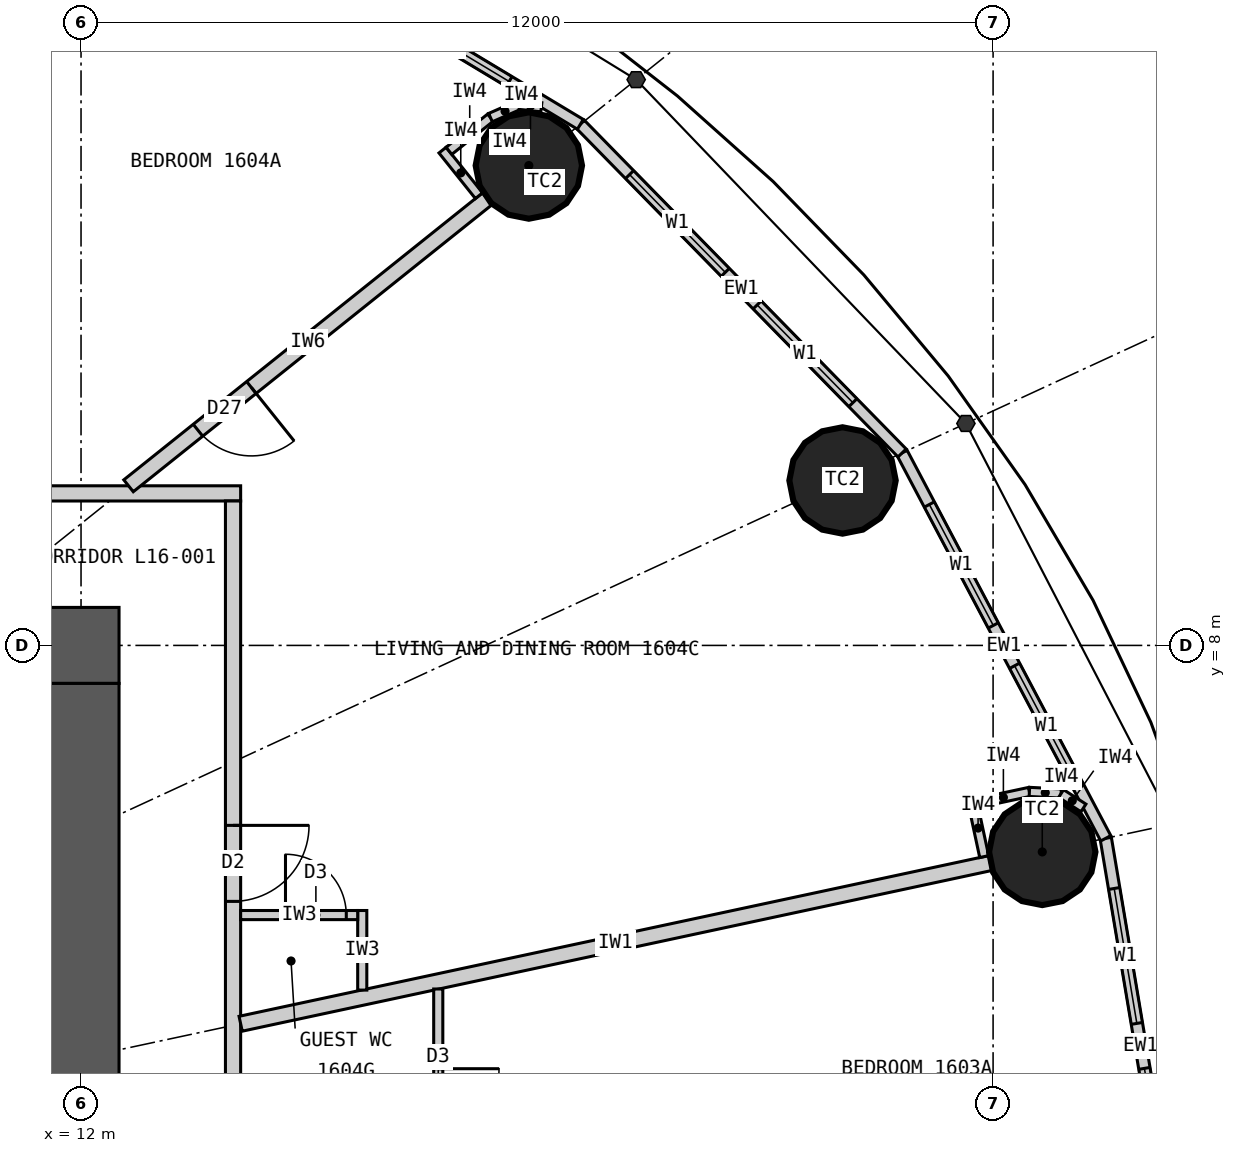
"""IFC4 building model, lengths in metres.
Left out: names, types, materials, properties, quantities, classifications, styles, units other than length and angle.
Written with IfcOpenShell. Run it as: python <this file> out.ifc"""

import sys

from ifc_helpers import new_model, si_unit, direction, frame, frame_2d, origin, origin_2d, place, context, subcontext, project, spatial, rectangle, circle, extrude, element, fill, save


model = new_model("IFC4")
c1 = context("Model", 3, precision=1e-05, world=origin(), true_north=direction((0.0, 1.0)))
c2 = subcontext(c1, "Body", "Model", "MODEL_VIEW")
j1 = project(units=[si_unit("LENGTHUNIT", "METRE"), si_unit("PLANEANGLEUNIT", "RADIAN")], contexts=[c1])
p1 = place(None, origin())
s1 = spatial("IfcSite", under=j1, at=p1, CompositionType="ELEMENT")
p2 = place(p1, origin())
s2 = spatial("IfcBuilding", under=s1, at=p2, CompositionType="ELEMENT")
p3 = place(p2, frame((0.0, 0.0, 67.2)))
s3 = spatial("IfcBuildingStorey", under=s2, at=p3, CompositionType="ELEMENT", Elevation=67.2)
for number, where, z_axis, x_axis in (
    (1, (24.647, 5.283, 0.0), (0.0, 0.0, 1.0), (1.0, 0.0, 0.0)),
    (2, (22.019, 10.17, 0.0), (0.0, 0.0, 1.0), (1.0, 0.0, 0.0)),
    (3, (17.892, 14.313, 0.0), (0.0, 0.0, 1.0), (1.0, 0.0, 0.0)),
):
    element("IfcColumn", number, at=place(p3, frame(where, z_axis=z_axis, x_axis=x_axis)), inside=s3, PredefinedType="COLUMN", context=c2, shape_type="SweptSolid", body=[
        extrude(circle(Radius=0.7, at=origin_2d()), origin(), (0.0, 0.0, 1.0), 3.3),
    ])
p4 = place(p3, frame((-12.5, 8.0, 0.0), z_axis=(0.0, 0.0, 1.0), x_axis=(1.0, 0.0, 0.0)))
e4 = element("IfcWall", 4, at=p4, inside=s3, PredefinedType="SHEAR", context=c2, shape_type="SweptSolid", body=[
    extrude(rectangle(XDim=25.0, YDim=1.0, at=frame_2d((12.5, 0.0))), origin(), (0.0, 0.0, 1.0), 3.3),
])
p5 = place(p4, frame((11.2, 0.0, 0.0)))
e5 = element("IfcOpeningElement", 5, at=p5, cuts=e4, PredefinedType="OPENING", context=c2, shape_type="SweptSolid", body=[
    extrude(rectangle(XDim=1.2, YDim=2.2, at=frame_2d((0.6, 1.1))), frame((0.0, 0.51, 0.0), z_axis=(0.0, -1.0, 0.0), x_axis=(1.0, 0.0, 0.0)), (0.0, 0.0, 1.0), 1.02),
])
p6 = place(p4, frame((18.8, 0.0, 0.0)))
e6 = element("IfcOpeningElement", 6, at=p6, cuts=e4, PredefinedType="OPENING", context=c2, shape_type="SweptSolid", body=[
    extrude(rectangle(XDim=0.9, YDim=2.2, at=frame_2d((0.45, 1.1))), frame((0.0, 0.51, 0.0), z_axis=(0.0, -1.0, 0.0), x_axis=(1.0, 0.0, 0.0)), (0.0, 0.0, 1.0), 1.02),
])
p7 = place(p3, frame((12.0, -7.5, 0.0), z_axis=(0.0, 0.0, 1.0), x_axis=(0.0, 1.0, 0.0)))
e7 = element("IfcWall", 7, at=p7, inside=s3, PredefinedType="SHEAR", context=c2, shape_type="SweptSolid", body=[
    extrude(rectangle(XDim=15.0, YDim=1.0, at=frame_2d((7.5, 0.0))), origin(), (0.0, 0.0, 1.0), 3.3),
])
p8 = place(p7, frame((6.6, 0.0, 0.0)))
e8 = element("IfcOpeningElement", 8, at=p8, cuts=e7, PredefinedType="OPENING", context=c2, shape_type="SweptSolid", body=[
    extrude(rectangle(XDim=1.8, YDim=2.2, at=frame_2d((0.9, 1.1))), frame((0.0, 0.51, 0.0), z_axis=(0.0, -1.0, 0.0), x_axis=(1.0, 0.0, 0.0)), (0.0, 0.0, 1.0), 1.02),
])
p9 = place(p3, frame((26.4, 0.0, 0.0), z_axis=(0.0, 0.0, 1.0), x_axis=(-0.165642551694, 0.986185857264, 0.0)))
e9 = element("IfcWall", 9, at=p9, inside=s3, PredefinedType="ELEMENTEDWALL", context=c2, shape_type="SweptSolid", body=[
    extrude(rectangle(XDim=5.539, YDim=0.15, at=frame_2d((2.77, 0.0))), origin(), (0.0, 0.0, 1.0), 3.12),
])
p10 = place(p9, frame((0.669, 0.0, 0.9)))
e10 = element("IfcOpeningElement", 10, at=p10, cuts=e9, PredefinedType="OPENING", context=c2, shape_type="SweptSolid", body=[
    extrude(rectangle(XDim=1.8, YDim=1.9, at=frame_2d((0.9, 0.95))), frame((0.0, 0.085, 0.0), z_axis=(0.0, -1.0, 0.0), x_axis=(1.0, 0.0, 0.0)), (0.0, 0.0, 1.0), 0.17),
])
p11 = place(p9, frame((3.07, 0.0, 0.9)))
e11 = element("IfcOpeningElement", 11, at=p11, cuts=e9, PredefinedType="OPENING", context=c2, shape_type="SweptSolid", body=[
    extrude(rectangle(XDim=1.8, YDim=1.9, at=frame_2d((0.9, 0.95))), frame((0.0, 0.085, 0.0), z_axis=(0.0, -1.0, 0.0), x_axis=(1.0, 0.0, 0.0)), (0.0, 0.0, 1.0), 0.17),
])
p12 = place(p3, frame((25.482, 5.462, 0.0), z_axis=(0.0, 0.0, 1.0), x_axis=(-0.467296867008, 0.884100468321, 0.0)))
e12 = element("IfcWall", 12, at=p12, inside=s3, PredefinedType="ELEMENTEDWALL", context=c2, shape_type="SweptSolid", body=[
    extrude(rectangle(XDim=5.734, YDim=0.15, at=frame_2d((2.867, 0.0))), origin(), (0.0, 0.0, 1.0), 3.12),
])
p13 = place(p12, frame((0.767, 0.0, 0.9)))
e13 = element("IfcOpeningElement", 13, at=p13, cuts=e12, PredefinedType="OPENING", context=c2, shape_type="SweptSolid", body=[
    extrude(rectangle(XDim=1.8, YDim=1.9, at=frame_2d((0.9, 0.95))), frame((0.0, 0.085, 0.0), z_axis=(0.0, -1.0, 0.0), x_axis=(1.0, 0.0, 0.0)), (0.0, 0.0, 1.0), 0.17),
])
p14 = place(p12, frame((3.167, 0.0, 0.9)))
e14 = element("IfcOpeningElement", 14, at=p14, cuts=e12, PredefinedType="OPENING", context=c2, shape_type="SweptSolid", body=[
    extrude(rectangle(XDim=1.8, YDim=1.9, at=frame_2d((0.9, 0.95))), frame((0.0, 0.085, 0.0), z_axis=(0.0, -1.0, 0.0), x_axis=(1.0, 0.0, 0.0)), (0.0, 0.0, 1.0), 0.17),
])
p15 = place(p3, frame((22.803, 10.532, 0.0), z_axis=(0.0, 0.0, 1.0), x_axis=(-0.699602905915, 0.714531856557, 0.0)))
e15 = element("IfcWall", 15, at=p15, inside=s3, PredefinedType="ELEMENTEDWALL", context=c2, shape_type="SweptSolid", body=[
    extrude(rectangle(XDim=6.051, YDim=0.15, at=frame_2d((3.025, 0.0))), origin(), (0.0, 0.0, 1.0), 3.12),
])
p16 = place(p15, frame((0.926, 0.0, 0.9)))
e16 = element("IfcOpeningElement", 16, at=p16, cuts=e15, PredefinedType="OPENING", context=c2, shape_type="SweptSolid", body=[
    extrude(rectangle(XDim=1.8, YDim=1.9, at=frame_2d((0.9, 0.95))), frame((0.0, 0.085, 0.0), z_axis=(0.0, -1.0, 0.0), x_axis=(1.0, 0.0, 0.0)), (0.0, 0.0, 1.0), 0.17),
])
p17 = place(p15, frame((3.325, 0.0, 0.9)))
e17 = element("IfcOpeningElement", 17, at=p17, cuts=e15, PredefinedType="OPENING", context=c2, shape_type="SweptSolid", body=[
    extrude(rectangle(XDim=1.8, YDim=1.9, at=frame_2d((0.9, 0.95))), frame((0.0, 0.085, 0.0), z_axis=(0.0, -1.0, 0.0), x_axis=(1.0, 0.0, 0.0)), (0.0, 0.0, 1.0), 0.17),
])
p18 = place(p3, frame((18.57, 14.856, 0.0), z_axis=(0.0, 0.0, 1.0), x_axis=(-0.856983180864, 0.515344377787, 0.0)))
e18 = element("IfcWall", 18, at=p18, inside=s3, PredefinedType="ELEMENTEDWALL", context=c2, shape_type="SweptSolid", body=[
    extrude(rectangle(XDim=6.386, YDim=0.15, at=frame_2d((3.193, 0.0))), origin(), (0.0, 0.0, 1.0), 3.12),
])
p19 = place(p18, frame((1.093, 0.0, 0.9)))
e19 = element("IfcOpeningElement", 19, at=p19, cuts=e18, PredefinedType="OPENING", context=c2, shape_type="SweptSolid", body=[
    extrude(rectangle(XDim=1.8, YDim=1.9, at=frame_2d((0.9, 0.95))), frame((0.0, 0.085, 0.0), z_axis=(0.0, -1.0, 0.0), x_axis=(1.0, 0.0, 0.0)), (0.0, 0.0, 1.0), 0.17),
])
p20 = place(p18, frame((3.493, 0.0, 0.9)))
e20 = element("IfcOpeningElement", 20, at=p20, cuts=e18, PredefinedType="OPENING", context=c2, shape_type="SweptSolid", body=[
    extrude(rectangle(XDim=1.8, YDim=1.9, at=frame_2d((0.9, 0.95))), frame((0.0, 0.085, 0.0), z_axis=(0.0, -1.0, 0.0), x_axis=(1.0, 0.0, 0.0)), (0.0, 0.0, 1.0), 0.17),
])
p21 = place(p3, frame((-14.1, 10.0, 0.0), z_axis=(0.0, 0.0, 1.0), x_axis=(1.0, 0.0, 0.0)))
e21 = element("IfcWall", 21, at=p21, inside=s3, PredefinedType="PARTITIONING", context=c2, shape_type="SweptSolid", body=[
    extrude(rectangle(XDim=28.2, YDim=0.2, at=frame_2d((14.1, 0.0))), origin(), (0.0, 0.0, 1.0), 3.12),
])
p22 = place(p21, frame((18.529, 0.0, 0.0)))
e22 = element("IfcOpeningElement", 22, at=p22, cuts=e21, PredefinedType="OPENING", context=c2, shape_type="SweptSolid", body=[
    extrude(rectangle(XDim=1.0, YDim=2.2, at=frame_2d((0.5, 1.1))), frame((0.0, 0.11, 0.0), z_axis=(0.0, -1.0, 0.0), x_axis=(1.0, 0.0, 0.0)), (0.0, 0.0, 1.0), 0.22),
])
p23 = place(p21, frame((14.623, 0.0, 0.0)))
e23 = element("IfcOpeningElement", 23, at=p23, cuts=e21, PredefinedType="OPENING", context=c2, shape_type="SweptSolid", body=[
    extrude(rectangle(XDim=1.0, YDim=2.2, at=frame_2d((0.5, 1.1))), frame((0.0, 0.11, 0.0), z_axis=(0.0, -1.0, 0.0), x_axis=(1.0, 0.0, 0.0)), (0.0, 0.0, 1.0), 0.22),
])
p24 = place(p21, frame((11.24, 0.0, 0.0)))
e24 = element("IfcOpeningElement", 24, at=p24, cuts=e21, PredefinedType="OPENING", context=c2, shape_type="SweptSolid", body=[
    extrude(rectangle(XDim=1.0, YDim=2.2, at=frame_2d((0.5, 1.1))), frame((0.0, 0.11, 0.0), z_axis=(0.0, -1.0, 0.0), x_axis=(1.0, 0.0, 0.0)), (0.0, 0.0, 1.0), 0.22),
])
p25 = place(p21, frame((8.671, 0.0, 0.0)))
e25 = element("IfcOpeningElement", 25, at=p25, cuts=e21, PredefinedType="OPENING", context=c2, shape_type="SweptSolid", body=[
    extrude(rectangle(XDim=1.0, YDim=2.2, at=frame_2d((0.5, 1.1))), frame((0.0, 0.11, 0.0), z_axis=(0.0, -1.0, 0.0), x_axis=(1.0, 0.0, 0.0)), (0.0, 0.0, 1.0), 0.22),
])
p26 = place(p21, frame((2.801, 0.0, 0.0)))
e26 = element("IfcOpeningElement", 26, at=p26, cuts=e21, PredefinedType="OPENING", context=c2, shape_type="SweptSolid", body=[
    extrude(rectangle(XDim=1.0, YDim=2.2, at=frame_2d((0.5, 1.1))), frame((0.0, 0.11, 0.0), z_axis=(0.0, -1.0, 0.0), x_axis=(1.0, 0.0, 0.0)), (0.0, 0.0, 1.0), 0.22),
])
p27 = place(p3, frame((14.0, -9.9, 0.0), z_axis=(0.0, 0.0, 1.0), x_axis=(0.0, 1.0, 0.0)))
e27 = element("IfcWall", 27, at=p27, inside=s3, PredefinedType="PARTITIONING", context=c2, shape_type="SweptSolid", body=[
    extrude(rectangle(XDim=19.8, YDim=0.2, at=frame_2d((9.9, 0.0))), origin(), (0.0, 0.0, 1.0), 3.12),
])
p28 = place(p27, frame((0.103, 0.0, 0.0)))
e28 = element("IfcOpeningElement", 28, at=p28, cuts=e27, PredefinedType="OPENING", context=c2, shape_type="SweptSolid", body=[
    extrude(rectangle(XDim=1.0, YDim=2.2, at=frame_2d((0.5, 1.1))), frame((0.0, 0.11, 0.0), z_axis=(0.0, -1.0, 0.0), x_axis=(1.0, 0.0, 0.0)), (0.0, 0.0, 1.0), 0.22),
])
p29 = place(p27, frame((5.248, 0.0, 0.0)))
e29 = element("IfcOpeningElement", 29, at=p29, cuts=e27, PredefinedType="OPENING", context=c2, shape_type="SweptSolid", body=[
    extrude(rectangle(XDim=1.0, YDim=2.2, at=frame_2d((0.5, 1.1))), frame((0.0, 0.11, 0.0), z_axis=(0.0, -1.0, 0.0), x_axis=(1.0, 0.0, 0.0)), (0.0, 0.0, 1.0), 0.22),
])
p30 = place(p27, frame((8.438, 0.0, 0.0)))
e30 = element("IfcOpeningElement", 30, at=p30, cuts=e27, PredefinedType="OPENING", context=c2, shape_type="SweptSolid", body=[
    extrude(rectangle(XDim=1.0, YDim=2.2, at=frame_2d((0.5, 1.1))), frame((0.0, 0.11, 0.0), z_axis=(0.0, -1.0, 0.0), x_axis=(1.0, 0.0, 0.0)), (0.0, 0.0, 1.0), 0.22),
])
p31 = place(p27, frame((14.532, 0.0, 0.0)))
e31 = element("IfcOpeningElement", 31, at=p31, cuts=e27, PredefinedType="OPENING", context=c2, shape_type="SweptSolid", body=[
    extrude(rectangle(XDim=1.0, YDim=2.2, at=frame_2d((0.5, 1.1))), frame((0.0, 0.11, 0.0), z_axis=(0.0, -1.0, 0.0), x_axis=(1.0, 0.0, 0.0)), (0.0, 0.0, 1.0), 0.22),
])
p32 = place(p3, frame((14.1, 3.022, 0.0), z_axis=(0.0, 0.0, 1.0), x_axis=(0.977790014929, 0.209586943072, 0.0)))
e32 = element("IfcWall", 32, at=p32, inside=s3, PredefinedType="PARTITIONING", context=c2, shape_type="SweptSolid", body=[
    extrude(rectangle(XDim=10.087, YDim=0.2, at=frame_2d((5.043, 0.0))), origin(), (0.0, 0.0, 1.0), 2.32),
])
p33 = place(p3, frame((12.625, 10.1, 0.0), z_axis=(0.0, 0.0, 1.0), x_axis=(0.780892451574, 0.624665493744, 0.0)))
e33 = element("IfcWall", 33, at=p33, inside=s3, PredefinedType="PARTITIONING", context=c2, shape_type="SweptSolid", body=[
    extrude(rectangle(XDim=6.045, YDim=0.2, at=frame_2d((3.022, 0.0))), origin(), (0.0, 0.0, 1.0), 2.32),
])
p34 = place(p33, frame((1.17, 0.0, 0.0)))
e34 = element("IfcOpeningElement", 34, at=p34, cuts=e33, PredefinedType="OPENING", context=c2, shape_type="SweptSolid", body=[
    extrude(rectangle(XDim=0.9, YDim=2.1, at=frame_2d((0.45, 1.05))), frame((0.0, 0.11, 0.0), z_axis=(0.0, -1.0, 0.0), x_axis=(1.0, 0.0, 0.0)), (0.0, 0.0, 1.0), 0.22),
])
p35 = place(p3, frame((7.289, 10.1, 0.0), z_axis=(0.0, 0.0, 1.0), x_axis=(0.585198353053, 0.810890182197, 0.0)))
e35 = element("IfcWall", 35, at=p35, inside=s3, PredefinedType="PARTITIONING", context=c2, shape_type="SweptSolid", body=[
    extrude(rectangle(XDim=8.36, YDim=0.2, at=frame_2d((4.18, 0.0))), origin(), (0.0, 0.0, 1.0), 2.32),
])
p36 = place(p3, frame((16.7, 3.48, 0.0), z_axis=(0.0, 0.0, 1.0), x_axis=(0.0, -1.0, 0.0)))
e36 = element("IfcWall", 36, at=p36, inside=s3, PredefinedType="PARTITIONING", context=c2, shape_type="SweptSolid", body=[
    extrude(rectangle(XDim=2.897, YDim=0.12, at=frame_2d((1.449, 0.0))), origin(), (0.0, 0.0, 1.0), 3.12),
])
p37 = place(p36, frame((1.049, 0.0, 0.0)))
e37 = element("IfcOpeningElement", 37, at=p37, cuts=e36, PredefinedType="OPENING", context=c2, shape_type="SweptSolid", body=[
    extrude(rectangle(XDim=0.8, YDim=2.1, at=frame_2d((0.4, 1.05))), frame((0.0, 0.07, 0.0), z_axis=(0.0, -1.0, 0.0), x_axis=(1.0, 0.0, 0.0)), (0.0, 0.0, 1.0), 0.14),
])
p38 = place(p3, frame((15.7, 3.465, 0.0), z_axis=(0.0, 0.0, 1.0), x_axis=(0.0, 1.0, 0.0)))
e38 = element("IfcWall", 38, at=p38, inside=s3, PredefinedType="PARTITIONING", context=c2, shape_type="SweptSolid", body=[
    extrude(rectangle(XDim=1.047, YDim=0.12, at=frame_2d((0.523, 0.0))), origin(), (0.0, 0.0, 1.0), 3.12),
])
p39 = place(p3, frame((14.1, 4.452, 0.0), z_axis=(0.0, 0.0, 1.0), x_axis=(1.0, 0.0, 0.0)))
e39 = element("IfcWall", 39, at=p39, inside=s3, PredefinedType="PARTITIONING", context=c2, shape_type="SweptSolid", body=[
    extrude(rectangle(XDim=1.54, YDim=0.12, at=frame_2d((0.77, 0.0))), origin(), (0.0, 0.0, 1.0), 3.12),
])
p40 = place(p39, frame((0.59, 0.0, 0.0)))
e40 = element("IfcOpeningElement", 40, at=p40, cuts=e39, PredefinedType="OPENING", context=c2, shape_type="SweptSolid", body=[
    extrude(rectangle(XDim=0.8, YDim=2.1, at=frame_2d((0.4, 1.05))), frame((0.0, 0.07, 0.0), z_axis=(0.0, -1.0, 0.0), x_axis=(1.0, 0.0, 0.0)), (0.0, 0.0, 1.0), 0.14),
])
p41 = place(p3, frame((23.883, 5.222, 0.0), z_axis=(0.0, 0.0, 1.0), x_axis=(-0.209311842415, 0.977848941619, 0.0)))
e41 = element("IfcWall", 41, at=p41, inside=s3, PredefinedType="PARTITIONING", context=c2, shape_type="SweptSolid", body=[
    extrude(rectangle(XDim=0.768, YDim=0.12, at=frame_2d((0.384, 0.0))), origin(), (0.0, 0.0, 1.0), 3.12),
])
p42 = place(p3, frame((23.793, 5.926, 0.0), z_axis=(0.0, 0.0, 1.0), x_axis=(0.977792206673, 0.209576717621, 0.0)))
e42 = element("IfcWall", 42, at=p42, inside=s3, PredefinedType="PARTITIONING", context=c2, shape_type="SweptSolid", body=[
    extrude(rectangle(XDim=0.7, YDim=0.12, at=frame_2d((0.35, 0.0))), origin(), (0.0, 0.0, 1.0), 3.12),
])
p43 = place(p3, frame((24.478, 6.073, 0.0), z_axis=(0.0, 0.0, 1.0), x_axis=(0.998708262812, -0.05081147302, 0.0)))
e43 = element("IfcWall", 43, at=p43, inside=s3, PredefinedType="PARTITIONING", context=c2, shape_type="SweptSolid", body=[
    extrude(rectangle(XDim=0.418, YDim=0.12, at=frame_2d((0.209, 0.0))), origin(), (0.0, 0.0, 1.0), 3.12),
])
p44 = place(p3, frame((24.895, 6.052, 0.0), z_axis=(0.0, 0.0, 1.0), x_axis=(0.839495197275, -0.54336710772, 0.0)))
e44 = element("IfcWall", 44, at=p44, inside=s3, PredefinedType="PARTITIONING", context=c2, shape_type="SweptSolid", body=[
    extrude(rectangle(XDim=0.35, YDim=0.12, at=frame_2d((0.175, 0.0))), origin(), (0.0, 0.0, 1.0), 3.12),
])
p45 = place(p3, frame((17.236, 13.917, 0.0), z_axis=(0.0, 0.0, 1.0), x_axis=(-0.624695047554, 0.780868809443, 0.0)))
e45 = element("IfcWall", 45, at=p45, inside=s3, PredefinedType="PARTITIONING", context=c2, shape_type="SweptSolid", body=[
    extrude(rectangle(XDim=0.768, YDim=0.12, at=frame_2d((0.384, 0.0))), origin(), (0.0, 0.0, 1.0), 3.12),
])
p46 = place(p3, frame((16.841, 14.507, 0.0), z_axis=(0.0, 0.0, 1.0), x_axis=(0.780902834923, 0.62465251333, 0.0)))
e46 = element("IfcWall", 46, at=p46, inside=s3, PredefinedType="PARTITIONING", context=c2, shape_type="SweptSolid", body=[
    extrude(rectangle(XDim=0.7, YDim=0.12, at=frame_2d((0.35, 0.0))), origin(), (0.0, 0.0, 1.0), 3.12),
])
p47 = place(p3, frame((17.387, 14.944, 0.0), z_axis=(0.0, 0.0, 1.0), x_axis=(0.916036698064, 0.401094462441, 0.0)))
e47 = element("IfcWall", 47, at=p47, inside=s3, PredefinedType="PARTITIONING", context=c2, shape_type="SweptSolid", body=[
    extrude(rectangle(XDim=0.418, YDim=0.12, at=frame_2d((0.209, 0.0))), origin(), (0.0, 0.0, 1.0), 3.12),
])
p48 = place(p3, frame((17.77, 15.112, 0.0), z_axis=(0.0, 0.0, 1.0), x_axis=(0.993904401174, -0.110245368731, 0.0)))
e48 = element("IfcWall", 48, at=p48, inside=s3, PredefinedType="PARTITIONING", context=c2, shape_type="SweptSolid", body=[
    extrude(rectangle(XDim=0.288, YDim=0.12, at=frame_2d((0.144, 0.0))), origin(), (0.0, 0.0, 1.0), 3.12),
])
p49 = place(p10, origin())
e49 = element("IfcWindow", 49, at=p49, inside=s3, PartitioningType="SINGLE_PANEL", PredefinedType="WINDOW", context=c2, shape_type="SweptSolid", body=[
    extrude(rectangle(XDim=1.8, YDim=1.9, at=frame_2d((0.9, 0.95))), frame((0.0, 0.03, 0.0), z_axis=(0.0, -1.0, 0.0), x_axis=(1.0, 0.0, 0.0)), (0.0, 0.0, 1.0), 0.06),
])
fill(e10, e49)
p50 = place(p11, origin())
e50 = element("IfcWindow", 50, at=p50, inside=s3, PartitioningType="SINGLE_PANEL", PredefinedType="WINDOW", context=c2, shape_type="SweptSolid", body=[
    extrude(rectangle(XDim=1.8, YDim=1.9, at=frame_2d((0.9, 0.95))), frame((0.0, 0.03, 0.0), z_axis=(0.0, -1.0, 0.0), x_axis=(1.0, 0.0, 0.0)), (0.0, 0.0, 1.0), 0.06),
])
fill(e11, e50)
p51 = place(p13, origin())
e51 = element("IfcWindow", 51, at=p51, inside=s3, PartitioningType="SINGLE_PANEL", PredefinedType="WINDOW", context=c2, shape_type="SweptSolid", body=[
    extrude(rectangle(XDim=1.8, YDim=1.9, at=frame_2d((0.9, 0.95))), frame((0.0, 0.03, 0.0), z_axis=(0.0, -1.0, 0.0), x_axis=(1.0, 0.0, 0.0)), (0.0, 0.0, 1.0), 0.06),
])
fill(e13, e51)
p52 = place(p14, origin())
e52 = element("IfcWindow", 52, at=p52, inside=s3, PartitioningType="SINGLE_PANEL", PredefinedType="WINDOW", context=c2, shape_type="SweptSolid", body=[
    extrude(rectangle(XDim=1.8, YDim=1.9, at=frame_2d((0.9, 0.95))), frame((0.0, 0.03, 0.0), z_axis=(0.0, -1.0, 0.0), x_axis=(1.0, 0.0, 0.0)), (0.0, 0.0, 1.0), 0.06),
])
fill(e14, e52)
p53 = place(p16, origin())
e53 = element("IfcWindow", 53, at=p53, inside=s3, PartitioningType="SINGLE_PANEL", PredefinedType="WINDOW", context=c2, shape_type="SweptSolid", body=[
    extrude(rectangle(XDim=1.8, YDim=1.9, at=frame_2d((0.9, 0.95))), frame((0.0, 0.03, 0.0), z_axis=(0.0, -1.0, 0.0), x_axis=(1.0, 0.0, 0.0)), (0.0, 0.0, 1.0), 0.06),
])
fill(e16, e53)
p54 = place(p17, origin())
e54 = element("IfcWindow", 54, at=p54, inside=s3, PartitioningType="SINGLE_PANEL", PredefinedType="WINDOW", context=c2, shape_type="SweptSolid", body=[
    extrude(rectangle(XDim=1.8, YDim=1.9, at=frame_2d((0.9, 0.95))), frame((0.0, 0.03, 0.0), z_axis=(0.0, -1.0, 0.0), x_axis=(1.0, 0.0, 0.0)), (0.0, 0.0, 1.0), 0.06),
])
fill(e17, e54)
p55 = place(p19, origin())
e55 = element("IfcWindow", 55, at=p55, inside=s3, PartitioningType="SINGLE_PANEL", PredefinedType="WINDOW", context=c2, shape_type="SweptSolid", body=[
    extrude(rectangle(XDim=1.8, YDim=1.9, at=frame_2d((0.9, 0.95))), frame((0.0, 0.03, 0.0), z_axis=(0.0, -1.0, 0.0), x_axis=(1.0, 0.0, 0.0)), (0.0, 0.0, 1.0), 0.06),
])
fill(e19, e55)
p56 = place(p37, origin())
e56 = element("IfcDoor", 56, at=p56, inside=s3, OperationType="SINGLE_SWING_LEFT", PredefinedType="DOOR", context=c2, shape_type="SweptSolid", body=[
    extrude(rectangle(XDim=0.8, YDim=2.1, at=frame_2d((0.4, 1.05))), frame((0.0, 0.025, 0.0), z_axis=(0.0, -1.0, 0.0), x_axis=(1.0, 0.0, 0.0)), (0.0, 0.0, 1.0), 0.05),
])
fill(e37, e56)
p57 = place(p40, origin())
e57 = element("IfcDoor", 57, at=p57, inside=s3, OperationType="SINGLE_SWING_LEFT", PredefinedType="DOOR", context=c2, shape_type="SweptSolid", body=[
    extrude(rectangle(XDim=0.8, YDim=2.1, at=frame_2d((0.4, 1.05))), frame((0.0, 0.025, 0.0), z_axis=(0.0, -1.0, 0.0), x_axis=(1.0, 0.0, 0.0)), (0.0, 0.0, 1.0), 0.05),
])
fill(e40, e57)
p58 = place(p31, origin())
e58 = element("IfcDoor", 58, at=p58, inside=s3, OperationType="SINGLE_SWING_RIGHT", PredefinedType="DOOR", context=c2, shape_type="SweptSolid", body=[
    extrude(rectangle(XDim=1.0, YDim=2.2, at=frame_2d((0.5, 1.1))), frame((0.0, 0.025, 0.0), z_axis=(0.0, -1.0, 0.0), x_axis=(1.0, 0.0, 0.0)), (0.0, 0.0, 1.0), 0.05),
])
fill(e31, e58)
p59 = place(p34, origin())
e59 = element("IfcDoor", 59, at=p59, inside=s3, OperationType="SINGLE_SWING_RIGHT", PredefinedType="DOOR", context=c2, shape_type="SweptSolid", body=[
    extrude(rectangle(XDim=0.9, YDim=2.1, at=frame_2d((0.45, 1.05))), frame((0.0, 0.025, 0.0), z_axis=(0.0, -1.0, 0.0), x_axis=(1.0, 0.0, 0.0)), (0.0, 0.0, 1.0), 0.05),
])
fill(e34, e59)
save(model, sys.argv[1])
